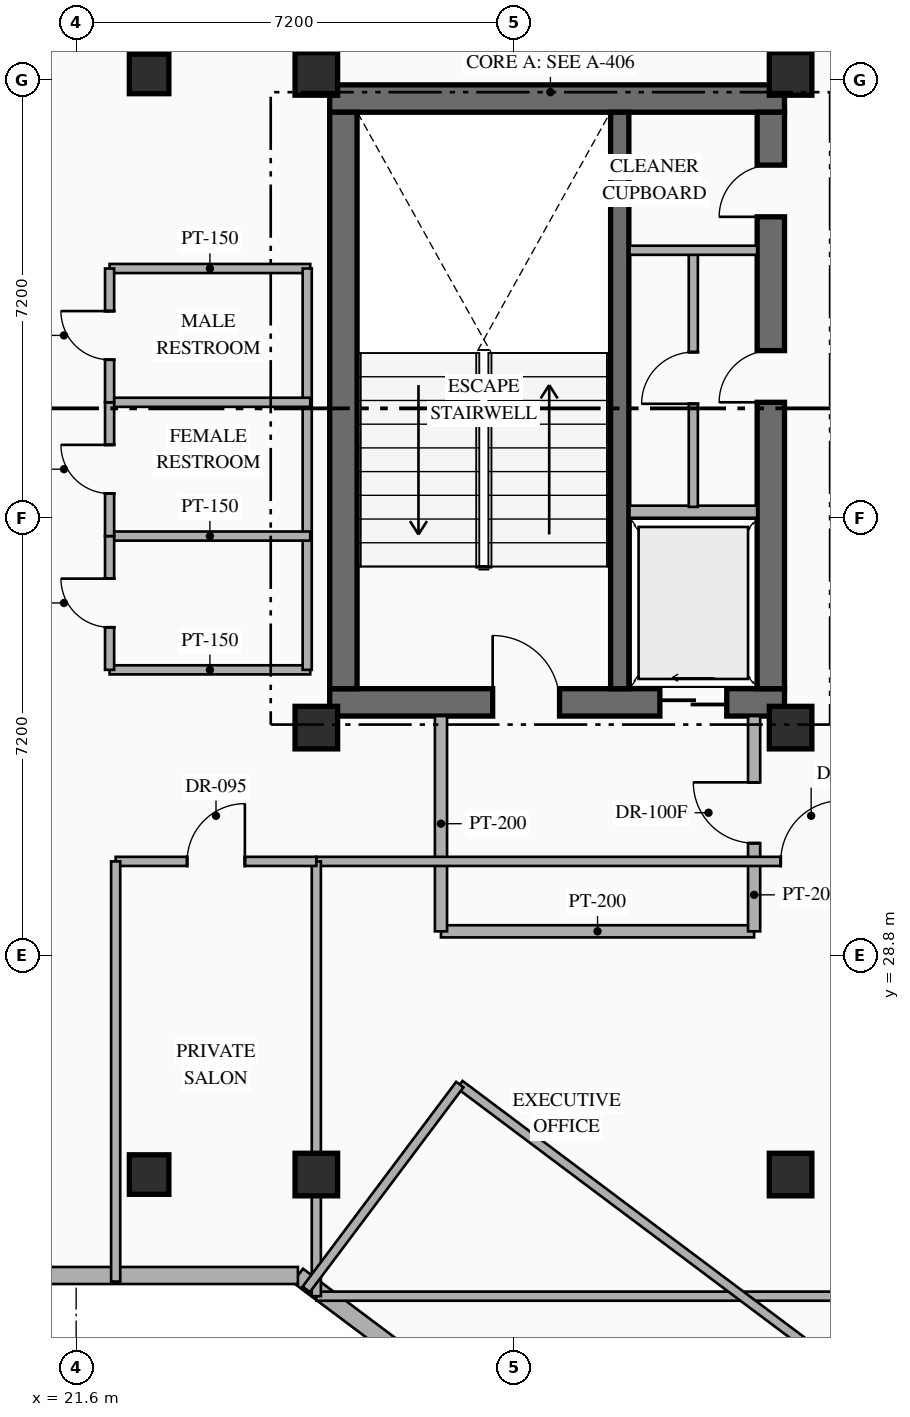
"""IFC4 building model, lengths in metres.
Left out: names, types, materials, properties, quantities, classifications, styles, units other than length and angle.
Written with IfcOpenShell. Run it as: python <this file> out.ifc"""

import sys

from ifc_helpers import new_model, si_unit, direction, frame, frame_2d, origin, origin_2d, place, context, subcontext, project, spatial, rectangle, hollow_rectangle, extrude, element, fill, save


model = new_model("IFC4")
c1 = context("Model", 3, precision=1e-05, world=origin(), true_north=direction((0.0, 1.0)))
c2 = subcontext(c1, "Body", "Model", "MODEL_VIEW")
j1 = project(units=[si_unit("LENGTHUNIT", "METRE"), si_unit("PLANEANGLEUNIT", "RADIAN")], contexts=[c1])
p1 = place(None, origin())
s1 = spatial("IfcSite", under=j1, at=p1, CompositionType="ELEMENT")
p2 = place(p1, origin())
s2 = spatial("IfcBuilding", under=s1, at=p2, CompositionType="ELEMENT")
p3 = place(p2, frame((0.0, 0.0, 220.35)))
s3 = spatial("IfcBuildingStorey", under=s2, at=p3, CompositionType="ELEMENT", Elevation=220.35)
p4 = place(p3, frame((25.77, 32.965, 0.0), z_axis=(0.0, 0.0, 1.0), x_axis=(1.0, 0.0, 0.0)))
e1 = element("IfcWall", 1, at=p4, inside=s3, PredefinedType="SHEAR", context=c2, shape_type="SweptSolid", body=[
    extrude(rectangle(XDim=7.48, YDim=0.45, at=frame_2d((3.74, 0.0))), origin(), (0.0, 0.0, 1.0), 3.6),
])
p5 = place(p4, frame((2.68, 0.0, 0.0)))
e2 = element("IfcOpeningElement", 2, at=p5, cuts=e1, PredefinedType="OPENING", context=c2, shape_type="SweptSolid", body=[
    extrude(rectangle(XDim=1.1, YDim=2.2, at=frame_2d((0.55, 1.1))), frame((0.0, 0.235, 0.0), z_axis=(0.0, -1.0, 0.0), x_axis=(1.0, 0.0, 0.0)), (0.0, 0.0, 1.0), 0.47),
])
p6 = place(p4, frame((5.43, 0.0, 0.0)))
e3 = element("IfcOpeningElement", 3, at=p6, cuts=e1, PredefinedType="OPENING", context=c2, shape_type="SweptSolid", body=[
    extrude(rectangle(XDim=1.1, YDim=2.15, at=frame_2d((0.55, 1.075))), frame((0.0, 0.235, 0.0), z_axis=(0.0, -1.0, 0.0), x_axis=(1.0, 0.0, 0.0)), (0.0, 0.0, 1.0), 0.47),
])
p7 = place(p3, frame((25.77, 42.895, 0.0), z_axis=(0.0, 0.0, 1.0), x_axis=(1.0, 0.0, 0.0)))
e4 = element("IfcWall", 4, at=p7, inside=s3, PredefinedType="SHEAR", context=c2, shape_type="SweptSolid", body=[
    extrude(rectangle(XDim=7.48, YDim=0.45, at=frame_2d((3.74, 0.0))), origin(), (0.0, 0.0, 1.0), 3.6),
])
p8 = place(p3, frame((25.995, 33.19, 0.0), z_axis=(0.0, 0.0, 1.0), x_axis=(0.0, 1.0, 0.0)))
e5 = element("IfcWall", 5, at=p8, inside=s3, PredefinedType="SHEAR", context=c2, shape_type="SweptSolid", body=[
    extrude(rectangle(XDim=9.48, YDim=0.45, at=frame_2d((4.74, 0.0))), origin(), (0.0, 0.0, 1.0), 3.6),
])
p9 = place(p3, frame((33.025, 33.19, 0.0), z_axis=(0.0, 0.0, 1.0), x_axis=(0.0, 1.0, 0.0)))
e6 = element("IfcWall", 6, at=p9, inside=s3, PredefinedType="SHEAR", context=c2, shape_type="SweptSolid", body=[
    extrude(rectangle(XDim=9.48, YDim=0.45, at=frame_2d((4.74, 0.0))), origin(), (0.0, 0.0, 1.0), 3.6),
])
p10 = place(p9, frame((4.71, 0.0, 0.0)))
e7 = element("IfcOpeningElement", 7, at=p10, cuts=e6, PredefinedType="OPENING", context=c2, shape_type="SweptSolid", body=[
    extrude(rectangle(XDim=0.85, YDim=2.08, at=frame_2d((0.425, 1.04))), frame((0.0, 0.235, 0.0), z_axis=(0.0, -1.0, 0.0), x_axis=(1.0, 0.0, 0.0)), (0.0, 0.0, 1.0), 0.47),
])
p11 = place(p9, frame((7.76, 0.0, 0.0)))
e8 = element("IfcOpeningElement", 8, at=p11, cuts=e6, PredefinedType="OPENING", context=c2, shape_type="SweptSolid", body=[
    extrude(rectangle(XDim=0.85, YDim=2.08, at=frame_2d((0.425, 1.04))), frame((0.0, 0.235, 0.0), z_axis=(0.0, -1.0, 0.0), x_axis=(1.0, 0.0, 0.0)), (0.0, 0.0, 1.0), 0.47),
])
p12 = place(p3, frame((30.54, 33.19, 0.0), z_axis=(0.0, 0.0, 1.0), x_axis=(0.0, 1.0, 0.0)))
e9 = element("IfcWall", 9, at=p12, inside=s3, PredefinedType="SHEAR", context=c2, shape_type="SweptSolid", body=[
    extrude(rectangle(XDim=9.48, YDim=0.3, at=frame_2d((4.74, 0.0))), origin(), (0.0, 0.0, 1.0), 3.6),
])
for number, where, z_axis, x_axis in (
    (10, (25.55, 32.55, 0.0), (0.0, 0.0, 1.0), (1.0, 0.0, 0.0)),
    (11, (33.35, 32.55, 0.0), (0.0, 0.0, 1.0), (1.0, 0.0, 0.0)),
    (12, (25.55, 43.3, 0.0), (0.0, 0.0, 1.0), (1.0, 0.0, 0.0)),
    (13, (33.35, 43.3, 0.0), (0.0, 0.0, 1.0), (1.0, 0.0, 0.0)),
    (14, (25.55, 25.2, 0.0), (0.0, 0.0, 1.0), (1.0, 0.0, 0.0)),
    (15, (33.35, 25.2, 0.0), (0.0, 0.0, 1.0), (1.0, 0.0, 0.0)),
):
    element("IfcColumn", number, at=place(p3, frame(where, z_axis=z_axis, x_axis=x_axis)), inside=s3, PredefinedType="COLUMN", context=c2, shape_type="SweptSolid", body=[
        extrude(hollow_rectangle(XDim=0.7, YDim=0.7, WallThickness=0.028, at=origin_2d()), origin(), (0.0, 0.0, 1.0), 3.6),
    ])
for number, where, z_axis, x_axis in (
    (16, (22.8, 25.2, 0.0), (0.0, 0.0, 1.0), (1.0, 0.0, 0.0)),
    (17, (22.8, 43.3, 0.0), (0.0, 0.0, 1.0), (1.0, 0.0, 0.0)),
):
    element("IfcColumn", number, at=place(p3, frame(where, z_axis=z_axis, x_axis=x_axis)), inside=s3, PredefinedType="COLUMN", context=c2, shape_type="SweptSolid", body=[
        extrude(hollow_rectangle(XDim=0.65, YDim=0.65, WallThickness=0.025, at=origin_2d()), origin(), (0.0, 0.0, 1.0), 3.6),
    ])
p13 = place(p3, frame((44.918, 8.787, 0.0), z_axis=(0.0, 0.0, 1.0), x_axis=(-0.800004765927, 0.599993645378, 0.0)))
e18 = element("IfcWall", 18, at=p13, inside=s3, PredefinedType="STANDARD", context=c2, shape_type="SweptSolid", body=[
    extrude(rectangle(XDim=24.588, YDim=0.28, at=frame_2d((12.294, 0.0))), origin(), (0.0, 0.0, 1.0), 3.35),
])
p14 = place(p3, frame((25.247, 23.54, 0.0), z_axis=(0.0, 0.0, 1.0), x_axis=(-1.0, 0.0, 0.0)))
e19 = element("IfcWall", 19, at=p14, inside=s3, PredefinedType="STANDARD", context=c2, shape_type="SweptSolid", body=[
    extrude(rectangle(XDim=4.789, YDim=0.28, at=frame_2d((2.395, 0.0))), origin(), (0.0, 0.0, 1.0), 3.35),
])
p15 = place(p3, frame((30.7, 36.1, 0.0), z_axis=(0.0, 0.0, 1.0), x_axis=(1.0, 0.0, 0.0)))
e20 = element("IfcWall", 20, at=p15, inside=s3, PredefinedType="STANDARD", context=c2, shape_type="SweptSolid", body=[
    extrude(rectangle(XDim=2.1, YDim=0.2, at=frame_2d((1.05, 0.0))), origin(), (0.0, 0.0, 1.0), 3.35),
])
p16 = place(p3, frame((31.75, 36.18, 0.0), z_axis=(0.0, 0.0, 1.0), x_axis=(0.0, 1.0, 0.0)))
e21 = element("IfcWall", 21, at=p16, inside=s3, PredefinedType="PARTITIONING", context=c2, shape_type="SweptSolid", body=[
    extrude(rectangle(XDim=4.24, YDim=0.15, at=frame_2d((2.12, 0.0))), origin(), (0.0, 0.0, 1.0), 3.35),
])
p17 = place(p16, frame((1.695, 0.0, 0.0)))
e22 = element("IfcOpeningElement", 22, at=p17, cuts=e21, PredefinedType="OPENING", context=c2, shape_type="SweptSolid", body=[
    extrude(rectangle(XDim=0.85, YDim=2.08, at=frame_2d((0.425, 1.04))), frame((0.0, 0.085, 0.0), z_axis=(0.0, -1.0, 0.0), x_axis=(1.0, 0.0, 0.0)), (0.0, 0.0, 1.0), 0.17),
])
p18 = place(p3, frame((30.7, 40.4, 0.0), z_axis=(0.0, 0.0, 1.0), x_axis=(1.0, 0.0, 0.0)))
e23 = element("IfcWall", 23, at=p18, inside=s3, PredefinedType="PARTITIONING", context=c2, shape_type="SweptSolid", body=[
    extrude(rectangle(XDim=2.1, YDim=0.15, at=frame_2d((1.05, 0.0))), origin(), (0.0, 0.0, 1.0), 3.35),
])
p19 = place(p3, frame((27.6, 29.2, 0.0), z_axis=(0.0, 0.0, 1.0), x_axis=(1.0, 0.0, 0.0)))
e24 = element("IfcWall", 24, at=p19, inside=s3, PredefinedType="STANDARD", context=c2, shape_type="SweptSolid", body=[
    extrude(rectangle(XDim=5.15, YDim=0.2, at=frame_2d((2.575, 0.0))), origin(), (0.0, 0.0, 1.0), 3.35),
])
p20 = place(p3, frame((27.6, 29.2, 0.0), z_axis=(0.0, 0.0, 1.0), x_axis=(0.0, 1.0, 0.0)))
e25 = element("IfcWall", 25, at=p20, inside=s3, PredefinedType="STANDARD", context=c2, shape_type="SweptSolid", body=[
    extrude(rectangle(XDim=3.54, YDim=0.2, at=frame_2d((1.77, 0.0))), origin(), (0.0, 0.0, 1.0), 3.35),
])
p21 = place(p3, frame((32.75, 29.2, 0.0), z_axis=(0.0, 0.0, 1.0), x_axis=(0.0, 1.0, 0.0)))
e26 = element("IfcWall", 26, at=p21, inside=s3, PredefinedType="STANDARD", context=c2, shape_type="SweptSolid", body=[
    extrude(rectangle(XDim=3.54, YDim=0.2, at=frame_2d((1.77, 0.0))), origin(), (0.0, 0.0, 1.0), 3.35),
])
p22 = place(p21, frame((1.45, 0.0, 0.0)))
e27 = element("IfcOpeningElement", 27, at=p22, cuts=e26, PredefinedType="OPENING", context=c2, shape_type="SweptSolid", body=[
    extrude(rectangle(XDim=1.0, YDim=2.2, at=frame_2d((0.5, 1.1))), frame((0.0, 0.11, 0.0), z_axis=(0.0, -1.0, 0.0), x_axis=(1.0, 0.0, 0.0)), (0.0, 0.0, 1.0), 0.22),
])
for number, where, z_axis, x_axis in (
    (28, (22.15, 33.5, 0.0), (0.0, 0.0, 1.0), (1.0, 0.0, 0.0)),
    (29, (22.15, 40.1, 0.0), (0.0, 0.0, 1.0), (1.0, 0.0, 0.0)),
):
    element("IfcWall", number, at=place(p3, frame(where, z_axis=z_axis, x_axis=x_axis)), inside=s3, PredefinedType="PARTITIONING", context=c2, shape_type="SweptSolid", body=[
        extrude(rectangle(XDim=3.3, YDim=0.15, at=frame_2d((1.65, 0.0))), origin(), (0.0, 0.0, 1.0), 3.35),
    ])
p23 = place(p3, frame((25.4, 33.5, 0.0), z_axis=(0.0, 0.0, 1.0), x_axis=(0.0, 1.0, 0.0)))
e30 = element("IfcWall", 30, at=p23, inside=s3, PredefinedType="PARTITIONING", context=c2, shape_type="SweptSolid", body=[
    extrude(rectangle(XDim=6.6, YDim=0.15, at=frame_2d((3.3, 0.0))), origin(), (0.0, 0.0, 1.0), 3.35),
])
for number, where, z_axis, x_axis in (
    (31, (22.15, 35.7, 0.0), (0.0, 0.0, 1.0), (1.0, 0.0, 0.0)),
    (32, (22.15, 37.9, 0.0), (0.0, 0.0, 1.0), (1.0, 0.0, 0.0)),
):
    element("IfcWall", number, at=place(p3, frame(where, z_axis=z_axis, x_axis=x_axis)), inside=s3, PredefinedType="PARTITIONING", context=c2, shape_type="SweptSolid", body=[
        extrude(rectangle(XDim=3.3, YDim=0.15, at=frame_2d((1.65, 0.0))), origin(), (0.0, 0.0, 1.0), 3.35),
    ])
p24 = place(p3, frame((22.15, 33.5, 0.0), z_axis=(0.0, 0.0, 1.0), x_axis=(0.0, 1.0, 0.0)))
e33 = element("IfcWall", 33, at=p24, inside=s3, PredefinedType="PARTITIONING", context=c2, shape_type="SweptSolid", body=[
    extrude(rectangle(XDim=2.2, YDim=0.15, at=frame_2d((1.1, 0.0))), origin(), (0.0, 0.0, 1.0), 3.35),
])
p25 = place(p24, frame((0.7, 0.0, 0.0)))
e34 = element("IfcOpeningElement", 34, at=p25, cuts=e33, PredefinedType="OPENING", context=c2, shape_type="SweptSolid", body=[
    extrude(rectangle(XDim=0.8, YDim=2.06, at=frame_2d((0.4, 1.03))), frame((0.0, 0.085, 0.0), z_axis=(0.0, -1.0, 0.0), x_axis=(1.0, 0.0, 0.0)), (0.0, 0.0, 1.0), 0.17),
])
p26 = place(p3, frame((22.15, 35.7, 0.0), z_axis=(0.0, 0.0, 1.0), x_axis=(0.0, 1.0, 0.0)))
e35 = element("IfcWall", 35, at=p26, inside=s3, PredefinedType="PARTITIONING", context=c2, shape_type="SweptSolid", body=[
    extrude(rectangle(XDim=2.2, YDim=0.15, at=frame_2d((1.1, 0.0))), origin(), (0.0, 0.0, 1.0), 3.35),
])
p27 = place(p26, frame((0.7, 0.0, 0.0)))
e36 = element("IfcOpeningElement", 36, at=p27, cuts=e35, PredefinedType="OPENING", context=c2, shape_type="SweptSolid", body=[
    extrude(rectangle(XDim=0.8, YDim=2.06, at=frame_2d((0.4, 1.03))), frame((0.0, 0.085, 0.0), z_axis=(0.0, -1.0, 0.0), x_axis=(1.0, 0.0, 0.0)), (0.0, 0.0, 1.0), 0.17),
])
p28 = place(p3, frame((22.15, 37.9, 0.0), z_axis=(0.0, 0.0, 1.0), x_axis=(0.0, 1.0, 0.0)))
e37 = element("IfcWall", 37, at=p28, inside=s3, PredefinedType="PARTITIONING", context=c2, shape_type="SweptSolid", body=[
    extrude(rectangle(XDim=2.2, YDim=0.15, at=frame_2d((1.1, 0.0))), origin(), (0.0, 0.0, 1.0), 3.35),
])
p29 = place(p28, frame((0.7, 0.0, 0.0)))
e38 = element("IfcOpeningElement", 38, at=p29, cuts=e37, PredefinedType="OPENING", context=c2, shape_type="SweptSolid", body=[
    extrude(rectangle(XDim=0.8, YDim=2.06, at=frame_2d((0.4, 1.03))), frame((0.0, 0.085, 0.0), z_axis=(0.0, -1.0, 0.0), x_axis=(1.0, 0.0, 0.0)), (0.0, 0.0, 1.0), 0.17),
])
p30 = place(p3, frame((25.55, 23.2, 0.0), z_axis=(0.0, 0.0, 1.0), x_axis=(1.0, 0.0, 0.0)))
e39 = element("IfcWall", 39, at=p30, inside=s3, PredefinedType="PARTITIONING", context=c2, shape_type="SweptSolid", body=[
    extrude(rectangle(XDim=9.4, YDim=0.15, at=frame_2d((4.7, 0.0))), origin(), (0.0, 0.0, 1.0), 3.35),
])
p31 = place(p3, frame((25.55, 30.35, 0.0), z_axis=(0.0, 0.0, 1.0), x_axis=(1.0, 0.0, 0.0)))
e40 = element("IfcWall", 40, at=p31, inside=s3, PredefinedType="PARTITIONING", context=c2, shape_type="SweptSolid", body=[
    extrude(rectangle(XDim=9.4, YDim=0.15, at=frame_2d((4.7, 0.0))), origin(), (0.0, 0.0, 1.0), 3.35),
])
p32 = place(p31, frame((7.638, 0.0, 0.0)))
e41 = element("IfcOpeningElement", 41, at=p32, cuts=e40, PredefinedType="OPENING", context=c2, shape_type="SweptSolid", body=[
    extrude(rectangle(XDim=1.0, YDim=2.15, at=frame_2d((0.5, 1.075))), frame((0.0, 0.085, 0.0), z_axis=(0.0, -1.0, 0.0), x_axis=(1.0, 0.0, 0.0)), (0.0, 0.0, 1.0), 0.17),
])
p33 = place(p3, frame((25.55, 23.2, 0.0), z_axis=(0.0, 0.0, 1.0), x_axis=(0.0, 1.0, 0.0)))
e42 = element("IfcWall", 42, at=p33, inside=s3, PredefinedType="PARTITIONING", context=c2, shape_type="SweptSolid", body=[
    extrude(rectangle(XDim=7.15, YDim=0.15, at=frame_2d((3.575, 0.0))), origin(), (0.0, 0.0, 1.0), 2.757),
])
p34 = place(p3, frame((22.25, 30.35, 0.0), z_axis=(0.0, 0.0, 1.0), x_axis=(1.0, 0.0, 0.0)))
e43 = element("IfcWall", 43, at=p34, inside=s3, PredefinedType="PARTITIONING", context=c2, shape_type="SweptSolid", body=[
    extrude(rectangle(XDim=3.3, YDim=0.15, at=frame_2d((1.65, 0.0))), origin(), (0.0, 0.0, 1.0), 3.35),
])
p35 = place(p34, frame((1.175, 0.0, 0.0)))
e44 = element("IfcOpeningElement", 44, at=p35, cuts=e43, PredefinedType="OPENING", context=c2, shape_type="SweptSolid", body=[
    extrude(rectangle(XDim=0.95, YDim=2.15, at=frame_2d((0.475, 1.075))), frame((0.0, 0.085, 0.0), z_axis=(0.0, -1.0, 0.0), x_axis=(1.0, 0.0, 0.0)), (0.0, 0.0, 1.0), 0.17),
])
p36 = place(p3, frame((22.25, 23.44, 0.0), z_axis=(0.0, 0.0, 1.0), x_axis=(0.0, 1.0, 0.0)))
e45 = element("IfcWall", 45, at=p36, inside=s3, PredefinedType="PARTITIONING", context=c2, shape_type="SweptSolid", body=[
    extrude(rectangle(XDim=6.91, YDim=0.15, at=frame_2d((3.455, 0.0))), origin(), (0.0, 0.0, 1.0), 3.35),
])
p37 = place(p3, frame((27.91, 26.68, 0.0), z_axis=(0.0, 0.0, 1.0), x_axis=(0.800005938517, -0.599992081896, 0.0)))
e46 = element("IfcWall", 46, at=p37, inside=s3, PredefinedType="PARTITIONING", context=c2, shape_type="SweptSolid", body=[
    extrude(rectangle(XDim=14.8, YDim=0.15, at=frame_2d((7.4, 0.0))), origin(), (0.0, 0.0, 1.0), 3.35),
])
p38 = place(p37, frame((9.281, 0.0, 0.0)))
e47 = element("IfcOpeningElement", 47, at=p38, cuts=e46, PredefinedType="OPENING", context=c2, shape_type="SweptSolid", body=[
    extrude(rectangle(XDim=0.95, YDim=2.15, at=frame_2d((0.475, 1.075))), frame((0.0, 0.085, 0.0), z_axis=(0.0, -1.0, 0.0), x_axis=(1.0, 0.0, 0.0)), (0.0, 0.0, 1.0), 0.17),
])
p39 = place(p3, frame((25.384, 23.312, 0.0), z_axis=(0.0, 0.0, 1.0), x_axis=(0.599990721155, 0.80000695905, 0.0)))
e48 = element("IfcWall", 48, at=p39, inside=s3, PredefinedType="PARTITIONING", context=c2, shape_type="SweptSolid", body=[
    extrude(rectangle(XDim=4.21, YDim=0.15, at=frame_2d((2.105, 0.0))), origin(), (0.0, 0.0, 1.0), 3.35),
])
p40 = place(p5, origin())
e49 = element("IfcDoor", 49, at=p40, inside=s3, OperationType="SINGLE_SWING_LEFT", PredefinedType="DOOR", context=c2, shape_type="SweptSolid", body=[
    extrude(rectangle(XDim=1.1, YDim=2.2, at=frame_2d((0.55, 1.1))), frame((0.0, 0.025, 0.0), z_axis=(0.0, -1.0, 0.0), x_axis=(1.0, 0.0, 0.0)), (0.0, 0.0, 1.0), 0.05),
])
fill(e2, e49)
p41 = place(p6, origin())
e50 = element("IfcDoor", 50, at=p41, inside=s3, OperationType="SLIDING_TO_LEFT", PredefinedType="USERDEFINED", context=c2, shape_type="SweptSolid", body=[
    extrude(rectangle(XDim=1.1, YDim=2.15, at=frame_2d((0.55, 1.075))), frame((0.0, 0.025, 0.0), z_axis=(0.0, -1.0, 0.0), x_axis=(1.0, 0.0, 0.0)), (0.0, 0.0, 1.0), 0.05),
])
fill(e3, e50)
p42 = place(p10, origin())
e51 = element("IfcDoor", 51, at=p42, inside=s3, OperationType="SINGLE_SWING_LEFT", PredefinedType="DOOR", context=c2, shape_type="SweptSolid", body=[
    extrude(rectangle(XDim=0.85, YDim=2.08, at=frame_2d((0.425, 1.04))), frame((0.0, 0.025, 0.0), z_axis=(0.0, -1.0, 0.0), x_axis=(1.0, 0.0, 0.0)), (0.0, 0.0, 1.0), 0.05),
])
fill(e7, e51)
p43 = place(p11, origin())
e52 = element("IfcDoor", 52, at=p43, inside=s3, OperationType="SINGLE_SWING_LEFT", PredefinedType="DOOR", context=c2, shape_type="SweptSolid", body=[
    extrude(rectangle(XDim=0.85, YDim=2.08, at=frame_2d((0.425, 1.04))), frame((0.0, 0.025, 0.0), z_axis=(0.0, -1.0, 0.0), x_axis=(1.0, 0.0, 0.0)), (0.0, 0.0, 1.0), 0.05),
])
fill(e8, e52)
p44 = place(p17, origin())
e53 = element("IfcDoor", 53, at=p44, inside=s3, OperationType="SINGLE_SWING_LEFT", PredefinedType="DOOR", context=c2, shape_type="SweptSolid", body=[
    extrude(rectangle(XDim=0.85, YDim=2.08, at=frame_2d((0.425, 1.04))), frame((0.0, 0.025, 0.0), z_axis=(0.0, -1.0, 0.0), x_axis=(1.0, 0.0, 0.0)), (0.0, 0.0, 1.0), 0.05),
])
fill(e22, e53)
p45 = place(p22, origin())
e54 = element("IfcDoor", 54, at=p45, inside=s3, OperationType="SINGLE_SWING_RIGHT", PredefinedType="DOOR", context=c2, shape_type="SweptSolid", body=[
    extrude(rectangle(XDim=1.0, YDim=2.2, at=frame_2d((0.5, 1.1))), frame((0.0, 0.025, 0.0), z_axis=(0.0, -1.0, 0.0), x_axis=(1.0, 0.0, 0.0)), (0.0, 0.0, 1.0), 0.05),
])
fill(e27, e54)
p46 = place(p25, origin())
e55 = element("IfcDoor", 55, at=p46, inside=s3, OperationType="SINGLE_SWING_RIGHT", PredefinedType="DOOR", context=c2, shape_type="SweptSolid", body=[
    extrude(rectangle(XDim=0.8, YDim=2.06, at=frame_2d((0.4, 1.03))), frame((0.0, 0.025, 0.0), z_axis=(0.0, -1.0, 0.0), x_axis=(1.0, 0.0, 0.0)), (0.0, 0.0, 1.0), 0.05),
])
fill(e34, e55)
p47 = place(p27, origin())
e56 = element("IfcDoor", 56, at=p47, inside=s3, OperationType="SINGLE_SWING_RIGHT", PredefinedType="DOOR", context=c2, shape_type="SweptSolid", body=[
    extrude(rectangle(XDim=0.8, YDim=2.06, at=frame_2d((0.4, 1.03))), frame((0.0, 0.025, 0.0), z_axis=(0.0, -1.0, 0.0), x_axis=(1.0, 0.0, 0.0)), (0.0, 0.0, 1.0), 0.05),
])
fill(e36, e56)
p48 = place(p29, origin())
e57 = element("IfcDoor", 57, at=p48, inside=s3, OperationType="SINGLE_SWING_RIGHT", PredefinedType="DOOR", context=c2, shape_type="SweptSolid", body=[
    extrude(rectangle(XDim=0.8, YDim=2.06, at=frame_2d((0.4, 1.03))), frame((0.0, 0.025, 0.0), z_axis=(0.0, -1.0, 0.0), x_axis=(1.0, 0.0, 0.0)), (0.0, 0.0, 1.0), 0.05),
])
fill(e38, e57)
p49 = place(p32, origin())
e58 = element("IfcDoor", 58, at=p49, inside=s3, OperationType="SINGLE_SWING_RIGHT", PredefinedType="DOOR", context=c2, shape_type="SweptSolid", body=[
    extrude(rectangle(XDim=1.0, YDim=2.15, at=frame_2d((0.5, 1.075))), frame((0.0, 0.025, 0.0), z_axis=(0.0, -1.0, 0.0), x_axis=(1.0, 0.0, 0.0)), (0.0, 0.0, 1.0), 0.05),
])
fill(e41, e58)
p50 = place(p35, origin())
e59 = element("IfcDoor", 59, at=p50, inside=s3, OperationType="SINGLE_SWING_RIGHT", PredefinedType="DOOR", context=c2, shape_type="SweptSolid", body=[
    extrude(rectangle(XDim=0.95, YDim=2.15, at=frame_2d((0.475, 1.075))), frame((0.0, 0.025, 0.0), z_axis=(0.0, -1.0, 0.0), x_axis=(1.0, 0.0, 0.0)), (0.0, 0.0, 1.0), 0.05),
])
fill(e44, e59)
save(model, sys.argv[1])
